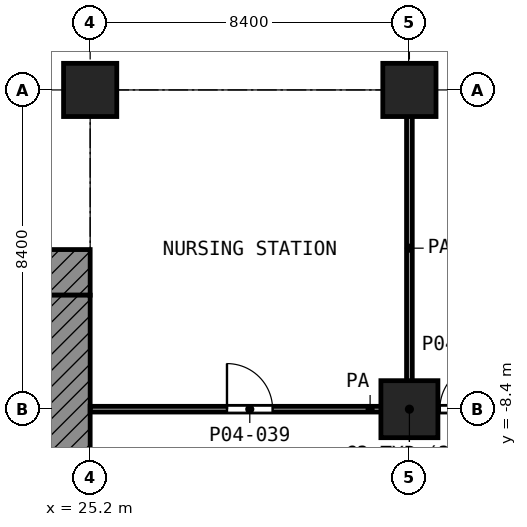
"""IFC4 building model, lengths in metres.
Left out: names, types, materials, properties, quantities, classifications, styles, units other than length and angle.
Written with IfcOpenShell. Run it as: python <this file> out.ifc"""

import sys

from ifc_helpers import new_model, si_unit, direction, frame, frame_2d, origin, origin_2d, place, context, subcontext, project, spatial, rectangle, extrude, element, fill, save


model = new_model("IFC4")
c1 = context("Model", 3, precision=1e-05, world=origin(), true_north=direction((0.0, 1.0)))
c2 = subcontext(c1, "Body", "Model", "MODEL_VIEW")
j1 = project(units=[si_unit("LENGTHUNIT", "METRE"), si_unit("PLANEANGLEUNIT", "RADIAN")], contexts=[c1])
p1 = place(None, origin())
s1 = spatial("IfcSite", under=j1, at=p1, CompositionType="ELEMENT")
p2 = place(p1, origin())
s2 = spatial("IfcBuilding", under=s1, at=p2, CompositionType="ELEMENT")
p3 = place(p2, frame((0.0, 0.0, 18.2)))
s3 = spatial("IfcBuildingStorey", under=s2, at=p3, CompositionType="ELEMENT", Elevation=18.2)
for number, where, z_axis, x_axis in (
    (1, (25.2, 0.0, 0.0), (0.0, 0.0, 1.0), (1.0, 0.0, 0.0)),
    (2, (33.6, 0.0, 0.0), (0.0, 0.0, 1.0), (1.0, 0.0, 0.0)),
):
    element("IfcColumn", number, at=place(p3, frame(where, z_axis=z_axis, x_axis=x_axis)), inside=s3, PredefinedType="COLUMN", context=c2, shape_type="SweptSolid", body=[
        extrude(rectangle(XDim=1.4, YDim=1.4, at=origin_2d()), origin(), (0.0, 0.0, 1.0), 5.6),
    ])
p4 = place(p3, frame((33.6, -8.4, 0.0), z_axis=(0.0, 0.0, 1.0), x_axis=(1.0, 0.0, 0.0)))
e3 = element("IfcColumn", 3, at=p4, inside=s3, PredefinedType="COLUMN", context=c2, shape_type="SweptSolid", body=[
    extrude(rectangle(XDim=1.5, YDim=1.5, at=origin_2d()), origin(), (0.0, 0.0, 1.0), 5.6),
])
p5 = place(p3, frame((4.2, -4.8, 0.0), z_axis=(0.0, 0.0, 1.0), x_axis=(1.0, 0.0, 0.0)))
e4 = element("IfcWall", 4, at=p5, inside=s3, PredefinedType="SHEAR", context=c2, shape_type="SweptSolid", body=[
    extrude(rectangle(XDim=21.0, YDim=1.2, at=frame_2d((10.5, 0.0))), origin(), (0.0, 0.0, 1.0), 5.05),
])
p6 = place(p5, frame((1.95, 0.0, 0.0)))
e5 = element("IfcOpeningElement", 5, at=p6, cuts=e4, PredefinedType="OPENING", context=c2, shape_type="SweptSolid", body=[
    extrude(rectangle(XDim=1.1, YDim=2.1, at=frame_2d((0.55, 1.05))), frame((0.0, 0.61, 0.0), z_axis=(0.0, -1.0, 0.0), x_axis=(1.0, 0.0, 0.0)), (0.0, 0.0, 1.0), 1.22),
])
p7 = place(p5, frame((17.95, 0.0, 0.0)))
e6 = element("IfcOpeningElement", 6, at=p7, cuts=e4, PredefinedType="OPENING", context=c2, shape_type="SweptSolid", body=[
    extrude(rectangle(XDim=1.1, YDim=2.1, at=frame_2d((0.55, 1.05))), frame((0.0, 0.61, 0.0), z_axis=(0.0, -1.0, 0.0), x_axis=(1.0, 0.0, 0.0)), (0.0, 0.0, 1.0), 1.22),
])
p8 = place(p3, frame((24.6, -24.0, 0.0), z_axis=(0.0, 0.0, 1.0), x_axis=(0.0, 1.0, 0.0)))
e7 = element("IfcWall", 7, at=p8, inside=s3, PredefinedType="SHEAR", context=c2, shape_type="SweptSolid", body=[
    extrude(rectangle(XDim=18.6, YDim=1.2, at=frame_2d((9.3, 0.0))), origin(), (0.0, 0.0, 1.0), 5.05),
])
p9 = place(p8, frame((10.5, 0.0, 0.0)))
e8 = element("IfcOpeningElement", 8, at=p9, cuts=e7, PredefinedType="OPENING", context=c2, shape_type="SweptSolid", body=[
    extrude(rectangle(XDim=1.8, YDim=2.1, at=frame_2d((0.9, 1.05))), frame((0.0, 0.61, 0.0), z_axis=(0.0, -1.0, 0.0), x_axis=(1.0, 0.0, 0.0)), (0.0, 0.0, 1.0), 1.22),
])
p10 = place(p3, frame((25.2, -8.4, 0.0), z_axis=(0.0, 0.0, 1.0), x_axis=(1.0, 0.0, 0.0)))
e9 = element("IfcWall", 9, at=p10, inside=s3, PredefinedType="PARTITIONING", context=c2, shape_type="SweptSolid", body=[
    extrude(rectangle(XDim=14.732, YDim=0.15, at=frame_2d((7.366, 0.0))), origin(), (0.0, 0.0, 1.0), 5.05),
])
p11 = place(p10, frame((3.6, 0.0, 0.0)))
e10 = element("IfcOpeningElement", 10, at=p11, cuts=e9, PredefinedType="OPENING", context=c2, shape_type="SweptSolid", body=[
    extrude(rectangle(XDim=1.2, YDim=2.1, at=frame_2d((0.6, 1.05))), frame((0.0, 0.085, 0.0), z_axis=(0.0, -1.0, 0.0), x_axis=(1.0, 0.0, 0.0)), (0.0, 0.0, 1.0), 0.17),
])
p12 = place(p10, frame((9.2, 0.0, 0.0)))
e11 = element("IfcOpeningElement", 11, at=p12, cuts=e9, PredefinedType="OPENING", context=c2, shape_type="SweptSolid", body=[
    extrude(rectangle(XDim=1.2, YDim=2.1, at=frame_2d((0.6, 1.05))), frame((0.0, 0.085, 0.0), z_axis=(0.0, -1.0, 0.0), x_axis=(1.0, 0.0, 0.0)), (0.0, 0.0, 1.0), 0.17),
])
p13 = place(p3, frame((33.6, -8.325, 0.0), z_axis=(0.0, 0.0, 1.0), x_axis=(0.0, 1.0, 0.0)))
e12 = element("IfcWall", 12, at=p13, inside=s3, PredefinedType="PARTITIONING", context=c2, shape_type="SweptSolid", body=[
    extrude(rectangle(XDim=8.323, YDim=0.15, at=frame_2d((4.162, 0.0))), origin(), (0.0, 0.0, 1.0), 5.05),
])
p14 = place(p11, origin())
e13 = element("IfcDoor", 13, at=p14, inside=s3, OperationType="SINGLE_SWING_LEFT", PredefinedType="DOOR", context=c2, shape_type="SweptSolid", body=[
    extrude(rectangle(XDim=1.2, YDim=2.1, at=frame_2d((0.6, 1.05))), frame((0.0, 0.025, 0.0), z_axis=(0.0, -1.0, 0.0), x_axis=(1.0, 0.0, 0.0)), (0.0, 0.0, 1.0), 0.05),
])
fill(e10, e13)
p15 = place(p12, origin())
e14 = element("IfcDoor", 14, at=p15, inside=s3, OperationType="SINGLE_SWING_RIGHT", PredefinedType="DOOR", context=c2, shape_type="SweptSolid", body=[
    extrude(rectangle(XDim=1.2, YDim=2.1, at=frame_2d((0.6, 1.05))), frame((0.0, 0.025, 0.0), z_axis=(0.0, -1.0, 0.0), x_axis=(1.0, 0.0, 0.0)), (0.0, 0.0, 1.0), 0.05),
])
fill(e11, e14)
save(model, sys.argv[1])
